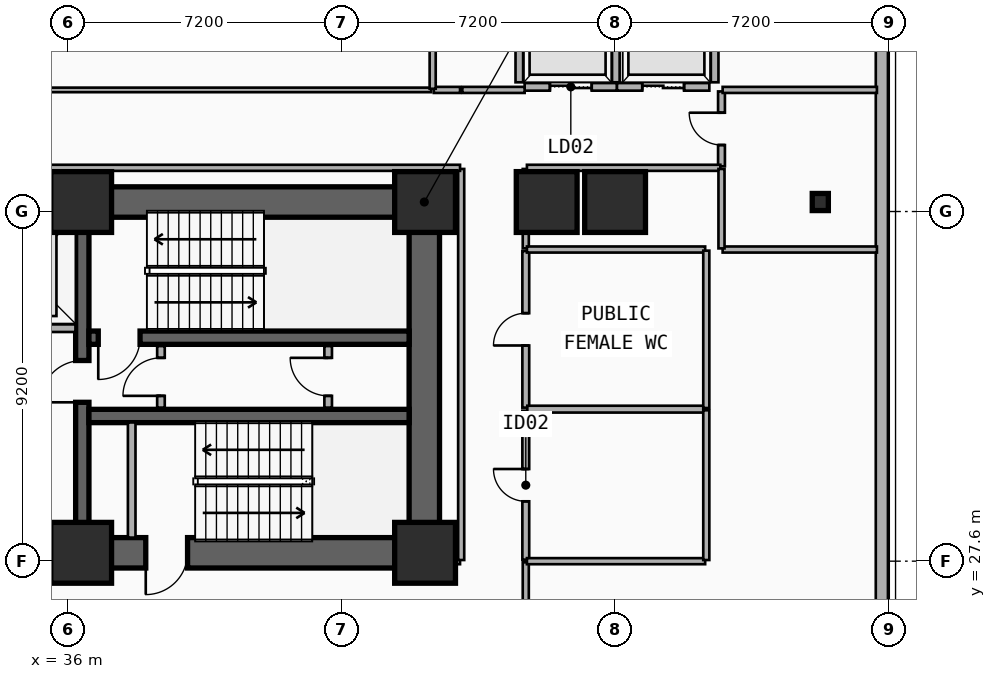
"""IFC4 building model, lengths in metres.
Left out: names, types, materials, properties, quantities, classifications, styles, units other than length and angle.
Written with IfcOpenShell. Run it as: python <this file> out.ifc"""

import sys

from ifc_helpers import new_model, si_unit, direction, frame, frame_2d, origin, origin_2d, place, context, subcontext, project, spatial, rectangle, i_section, extrude, element, fill, save


model = new_model("IFC4")
c1 = context("Model", 3, precision=1e-05, world=origin(), true_north=direction((0.0, 1.0)))
c2 = subcontext(c1, "Body", "Model", "MODEL_VIEW")
j1 = project(units=[si_unit("LENGTHUNIT", "METRE"), si_unit("PLANEANGLEUNIT", "RADIAN")], contexts=[c1])
p1 = place(None, origin())
s1 = spatial("IfcSite", under=j1, at=p1, CompositionType="ELEMENT")
p2 = place(p1, origin())
s2 = spatial("IfcBuilding", under=s1, at=p2, CompositionType="ELEMENT")
p3 = place(p2, frame((0.0, 0.0, 14.9)))
s3 = spatial("IfcBuildingStorey", under=s2, at=p3, CompositionType="ELEMENT", Elevation=14.9)
p4 = place(p3, frame((12.15, 37.05, 0.0), z_axis=(0.0, 0.0, 1.0), x_axis=(1.0, 0.0, 0.0)))
e1 = element("IfcWall", 1, at=p4, inside=s3, PredefinedType="SHEAR", context=c2, shape_type="SweptSolid", body=[
    extrude(rectangle(XDim=33.23, YDim=0.8, at=frame_2d((16.615, 0.0))), origin(), (0.0, 0.0, 1.0), 4.5),
])
p5 = place(p3, frame((45.38, 27.82, 0.0), z_axis=(0.0, 0.0, 1.0), x_axis=(-1.0, 0.0, 0.0)))
e2 = element("IfcWall", 2, at=p5, inside=s3, PredefinedType="SHEAR", context=c2, shape_type="SweptSolid", body=[
    extrude(rectangle(XDim=12.23, YDim=0.8, at=frame_2d((6.115, 0.0))), origin(), (0.0, 0.0, 1.0), 4.5),
])
p6 = place(p5, frame((9.93, 0.0, 0.0)))
e3 = element("IfcOpeningElement", 3, at=p6, cuts=e2, PredefinedType="OPENING", context=c2, shape_type="SweptSolid", body=[
    extrude(rectangle(XDim=1.1, YDim=2.15, at=frame_2d((0.55, 1.075))), frame((0.0, 0.41, 0.0), z_axis=(0.0, -1.0, 0.0), x_axis=(1.0, 0.0, 0.0)), (0.0, 0.0, 1.0), 0.82),
])
p7 = place(p5, frame((6.23, 0.0, 0.0)))
e4 = element("IfcOpeningElement", 4, at=p7, cuts=e2, PredefinedType="OPENING", context=c2, shape_type="SweptSolid", body=[
    extrude(rectangle(XDim=1.1, YDim=2.15, at=frame_2d((0.55, 1.075))), frame((0.0, 0.41, 0.0), z_axis=(0.0, -1.0, 0.0), x_axis=(1.0, 0.0, 0.0)), (0.0, 0.0, 1.0), 0.82),
])
p8 = place(p3, frame((45.38, 28.22, 0.0), z_axis=(0.0, 0.0, 1.0), x_axis=(0.0, 1.0, 0.0)))
e5 = element("IfcWall", 5, at=p8, inside=s3, PredefinedType="SHEAR", context=c2, shape_type="SweptSolid", body=[
    extrude(rectangle(XDim=8.43, YDim=0.8, at=frame_2d((4.215, 0.0))), origin(), (0.0, 0.0, 1.0), 4.5),
])
p9 = place(p3, frame((36.38, 28.22, 0.0), z_axis=(0.0, 0.0, 1.0), x_axis=(0.0, 1.0, 0.0)))
e6 = element("IfcWall", 6, at=p9, inside=s3, PredefinedType="SHEAR", context=c2, shape_type="SweptSolid", body=[
    extrude(rectangle(XDim=8.43, YDim=0.35, at=frame_2d((4.215, 0.0))), origin(), (0.0, 0.0, 1.0), 4.5),
])
p10 = place(p9, frame((3.56, 0.0, 0.0)))
e7 = element("IfcOpeningElement", 7, at=p10, cuts=e6, PredefinedType="OPENING", context=c2, shape_type="SweptSolid", body=[
    extrude(rectangle(XDim=1.1, YDim=2.15, at=frame_2d((0.55, 1.075))), frame((0.0, 0.185, 0.0), z_axis=(0.0, -1.0, 0.0), x_axis=(1.0, 0.0, 0.0)), (0.0, 0.0, 1.0), 0.37),
])
p11 = place(p3, frame((44.98, 33.48, 0.0), z_axis=(0.0, 0.0, 1.0), x_axis=(-1.0, 0.0, 0.0)))
e8 = element("IfcWall", 8, at=p11, inside=s3, PredefinedType="SHEAR", context=c2, shape_type="SweptSolid", body=[
    extrude(rectangle(XDim=8.425, YDim=0.35, at=frame_2d((4.212, 0.0))), origin(), (0.0, 0.0, 1.0), 4.5),
])
p12 = place(p11, frame((7.08, 0.0, 0.0)))
e9 = element("IfcOpeningElement", 9, at=p12, cuts=e8, PredefinedType="OPENING", context=c2, shape_type="SweptSolid", body=[
    extrude(rectangle(XDim=1.1, YDim=2.15, at=frame_2d((0.55, 1.075))), frame((0.0, 0.185, 0.0), z_axis=(0.0, -1.0, 0.0), x_axis=(1.0, 0.0, 0.0)), (0.0, 0.0, 1.0), 0.37),
])
p13 = place(p3, frame((36.555, 31.42, 0.0), z_axis=(0.0, 0.0, 1.0), x_axis=(1.0, 0.0, 0.0)))
e10 = element("IfcWall", 10, at=p13, inside=s3, PredefinedType="SHEAR", context=c2, shape_type="SweptSolid", body=[
    extrude(rectangle(XDim=8.425, YDim=0.35, at=frame_2d((4.212, 0.0))), origin(), (0.0, 0.0, 1.0), 4.5),
])
for number, where, z_axis, x_axis in (
    (11, (36.35, 27.82, 0.0), (0.0, 0.0, 1.0), (1.0, 0.0, 0.0)),
    (12, (36.35, 37.05, 0.0), (0.0, 0.0, 1.0), (1.0, 0.0, 0.0)),
    (13, (45.4, 27.82, 0.0), (0.0, 0.0, 1.0), (1.0, 0.0, 0.0)),
    (14, (45.4, 37.05, 0.0), (0.0, 0.0, 1.0), (1.0, 0.0, 0.0)),
    (15, (48.6, 37.05, 0.0), (0.0, 0.0, 1.0), (1.0, 0.0, 0.0)),
    (16, (50.4, 37.05, 0.0), (0.0, 0.0, 1.0), (1.0, 0.0, 0.0)),
):
    element("IfcColumn", number, at=place(p3, frame(where, z_axis=z_axis, x_axis=x_axis)), inside=s3, PredefinedType="COLUMN", context=c2, shape_type="SweptSolid", body=[
        extrude(rectangle(XDim=1.6, YDim=1.6, at=origin_2d()), origin(), (0.0, 0.0, 1.0), 4.5),
    ])
p14 = place(p3, frame((55.8, 37.05, 0.0), z_axis=(0.0, 0.0, 1.0), x_axis=(1.0, 0.0, 0.0)))
e17 = element("IfcColumn", 17, at=p14, inside=s3, PredefinedType="COLUMN", context=c2, shape_type="SweptSolid", body=[
    extrude(i_section(OverallWidth=0.424, OverallDepth=0.45, WebThickness=0.041, FlangeThickness=0.065, FilletRadius=0.015, at=origin_2d()), origin(), (0.0, 0.0, 1.0), 4.5),
])
p15 = place(p3, frame((57.42, 41.6, 0.0), z_axis=(0.0, 0.0, 1.0), x_axis=(0.0, -1.0, 0.0)))
e18 = element("IfcWall", 18, at=p15, inside=s3, PredefinedType="SOLIDWALL", context=c2, shape_type="SweptSolid", body=[
    extrude(rectangle(XDim=34.4, YDim=0.32, at=frame_2d((17.2, 0.0))), origin(), (0.0, 0.0, 1.0), 4.2),
])
p16 = place(p15, frame((20.727, 0.0, 0.9)))
e19 = element("IfcOpeningElement", 19, at=p16, cuts=e18, PredefinedType="OPENING", context=c2, shape_type="SweptSolid", body=[
    extrude(rectangle(XDim=2.4, YDim=1.8, at=frame_2d((1.2, 0.9))), frame((0.0, 0.17, 0.0), z_axis=(0.0, -1.0, 0.0), x_axis=(1.0, 0.0, 0.0)), (0.0, 0.0, 1.0), 0.34),
])
p17 = place(p15, frame((27.403, 0.0, 0.9)))
e20 = element("IfcOpeningElement", 20, at=p17, cuts=e18, PredefinedType="OPENING", context=c2, shape_type="SweptSolid", body=[
    extrude(rectangle(XDim=2.4, YDim=1.8, at=frame_2d((1.2, 0.9))), frame((0.0, 0.17, 0.0), z_axis=(0.0, -1.0, 0.0), x_axis=(1.0, 0.0, 0.0)), (0.0, 0.0, 1.0), 0.34),
])
p18 = place(p3, frame((33.475, 33.73, 0.0), z_axis=(0.0, 0.0, 1.0), x_axis=(1.0, 0.0, 0.0)))
e21 = element("IfcWall", 21, at=p18, inside=s3, PredefinedType="PARTITIONING", context=c2, shape_type="SweptSolid", body=[
    extrude(rectangle(XDim=2.725, YDim=0.2, at=frame_2d((1.362, 0.0))), origin(), (0.0, 0.0, 1.0), 3.172),
])
p19 = place(p18, frame((0.812, 0.0, 0.0)))
e22 = element("IfcOpeningElement", 22, at=p19, cuts=e21, PredefinedType="OPENING", context=c2, shape_type="SweptSolid", body=[
    extrude(rectangle(XDim=1.1, YDim=2.15, at=frame_2d((0.55, 1.075))), frame((0.0, 0.11, 0.0), z_axis=(0.0, -1.0, 0.0), x_axis=(1.0, 0.0, 0.0)), (0.0, 0.0, 1.0), 0.22),
])
p20 = place(p3, frame((48.02, 40.08, 0.0), z_axis=(0.0, 0.0, 1.0), x_axis=(1.0, 0.0, 0.0)))
e23 = element("IfcWall", 23, at=p20, inside=s3, PredefinedType="PARTITIONING", context=c2, shape_type="SweptSolid", body=[
    extrude(rectangle(XDim=2.43, YDim=0.2, at=frame_2d((1.215, 0.0))), origin(), (0.0, 0.0, 1.0), 4.2),
])
p21 = place(p20, frame((0.665, 0.0, 0.0)))
e24 = element("IfcOpeningElement", 24, at=p21, cuts=e23, PredefinedType="OPENING", context=c2, shape_type="SweptSolid", body=[
    extrude(rectangle(XDim=1.1, YDim=2.15, at=frame_2d((0.55, 1.075))), frame((0.0, 0.11, 0.0), z_axis=(0.0, -1.0, 0.0), x_axis=(1.0, 0.0, 0.0)), (0.0, 0.0, 1.0), 0.22),
])
for number, where, z_axis, x_axis in (
    (25, (47.88, 40.2, 0.0), (0.0, 0.0, 1.0), (0.0, 1.0, 0.0)),
    (26, (50.42, 40.2, 0.0), (0.0, 0.0, 1.0), (0.0, 1.0, 0.0)),
):
    element("IfcWall", number, at=place(p3, frame(where, z_axis=z_axis, x_axis=x_axis)), inside=s3, PredefinedType="PARTITIONING", context=c2, shape_type="SweptSolid", body=[
        extrude(rectangle(XDim=2.6, YDim=0.2, at=frame_2d((1.3, 0.0))), origin(), (0.0, 0.0, 1.0), 4.2),
    ])
p22 = place(p3, frame((50.45, 40.08, 0.0), z_axis=(0.0, 0.0, 1.0), x_axis=(1.0, 0.0, 0.0)))
e27 = element("IfcWall", 27, at=p22, inside=s3, PredefinedType="PARTITIONING", context=c2, shape_type="SweptSolid", body=[
    extrude(rectangle(XDim=2.43, YDim=0.2, at=frame_2d((1.215, 0.0))), origin(), (0.0, 0.0, 1.0), 4.2),
])
p23 = place(p22, frame((0.665, 0.0, 0.0)))
e28 = element("IfcOpeningElement", 28, at=p23, cuts=e27, PredefinedType="OPENING", context=c2, shape_type="SweptSolid", body=[
    extrude(rectangle(XDim=1.1, YDim=2.15, at=frame_2d((0.55, 1.075))), frame((0.0, 0.11, 0.0), z_axis=(0.0, -1.0, 0.0), x_axis=(1.0, 0.0, 0.0)), (0.0, 0.0, 1.0), 0.22),
])
p24 = place(p3, frame((53.02, 40.2, 0.0), z_axis=(0.0, 0.0, 1.0), x_axis=(0.0, 1.0, 0.0)))
e29 = element("IfcWall", 29, at=p24, inside=s3, PredefinedType="PARTITIONING", context=c2, shape_type="SweptSolid", body=[
    extrude(rectangle(XDim=2.6, YDim=0.2, at=frame_2d((1.3, 0.0))), origin(), (0.0, 0.0, 1.0), 4.2),
])
p25 = place(p3, frame((37.68, 28.22, 0.0), z_axis=(0.0, 0.0, 1.0), x_axis=(0.0, 1.0, 0.0)))
e30 = element("IfcWall", 30, at=p25, inside=s3, PredefinedType="PARTITIONING", context=c2, shape_type="SweptSolid", body=[
    extrude(rectangle(XDim=3.03, YDim=0.2, at=frame_2d((1.515, 0.0))), origin(), (0.0, 0.0, 1.0), 4.2),
])
p26 = place(p3, frame((38.45, 31.64, 0.0), z_axis=(0.0, 0.0, 1.0), x_axis=(0.0, 1.0, 0.0)))
e31 = element("IfcWall", 31, at=p26, inside=s3, PredefinedType="PARTITIONING", context=c2, shape_type="SweptSolid", body=[
    extrude(rectangle(XDim=1.62, YDim=0.2, at=frame_2d((0.81, 0.0))), origin(), (0.0, 0.0, 1.0), 4.2),
])
p27 = place(p26, frame((0.31, 0.0, 0.0)))
e32 = element("IfcOpeningElement", 32, at=p27, cuts=e31, PredefinedType="OPENING", context=c2, shape_type="SweptSolid", body=[
    extrude(rectangle(XDim=1.0, YDim=2.15, at=frame_2d((0.5, 1.075))), frame((0.0, 0.11, 0.0), z_axis=(0.0, -1.0, 0.0), x_axis=(1.0, 0.0, 0.0)), (0.0, 0.0, 1.0), 0.22),
])
p28 = place(p3, frame((42.85, 31.64, 0.0), z_axis=(0.0, 0.0, 1.0), x_axis=(0.0, 1.0, 0.0)))
e33 = element("IfcWall", 33, at=p28, inside=s3, PredefinedType="PARTITIONING", context=c2, shape_type="SweptSolid", body=[
    extrude(rectangle(XDim=1.62, YDim=0.2, at=frame_2d((0.81, 0.0))), origin(), (0.0, 0.0, 1.0), 4.2),
])
p29 = place(p28, frame((0.31, 0.0, 0.0)))
e34 = element("IfcOpeningElement", 34, at=p29, cuts=e33, PredefinedType="OPENING", context=c2, shape_type="SweptSolid", body=[
    extrude(rectangle(XDim=1.0, YDim=2.15, at=frame_2d((0.5, 1.075))), frame((0.0, 0.11, 0.0), z_axis=(0.0, -1.0, 0.0), x_axis=(1.0, 0.0, 0.0)), (0.0, 0.0, 1.0), 0.22),
])
p30 = place(p3, frame((48.05, 27.64, 0.0), z_axis=(0.0, 0.0, 1.0), x_axis=(0.0, 1.0, 0.0)))
e35 = element("IfcWall", 35, at=p30, inside=s3, PredefinedType="PLUMBINGWALL", context=c2, shape_type="SweptSolid", body=[
    extrude(rectangle(XDim=3.92, YDim=0.18, at=frame_2d((1.96, 0.0))), origin(), (0.0, 0.0, 1.0), 4.2),
])
p31 = place(p30, frame((1.535, 0.0, 0.0)))
e36 = element("IfcOpeningElement", 36, at=p31, cuts=e35, PredefinedType="OPENING", context=c2, shape_type="SweptSolid", body=[
    extrude(rectangle(XDim=0.85, YDim=2.1, at=frame_2d((0.425, 1.05))), frame((0.0, 0.1, 0.0), z_axis=(0.0, -1.0, 0.0), x_axis=(1.0, 0.0, 0.0)), (0.0, 0.0, 1.0), 0.2),
])
p32 = place(p3, frame((48.05, 31.64, 0.0), z_axis=(0.0, 0.0, 1.0), x_axis=(0.0, 1.0, 0.0)))
e37 = element("IfcWall", 37, at=p32, inside=s3, PredefinedType="PLUMBINGWALL", context=c2, shape_type="SweptSolid", body=[
    extrude(rectangle(XDim=4.12, YDim=0.18, at=frame_2d((2.06, 0.0))), origin(), (0.0, 0.0, 1.0), 4.2),
])
p33 = place(p32, frame((1.635, 0.0, 0.0)))
e38 = element("IfcOpeningElement", 38, at=p33, cuts=e37, PredefinedType="OPENING", context=c2, shape_type="SweptSolid", body=[
    extrude(rectangle(XDim=0.85, YDim=2.1, at=frame_2d((0.425, 1.05))), frame((0.0, 0.1, 0.0), z_axis=(0.0, -1.0, 0.0), x_axis=(1.0, 0.0, 0.0)), (0.0, 0.0, 1.0), 0.2),
])
p34 = place(p3, frame((12.04, 40.0, 0.0), z_axis=(0.0, 0.0, 1.0), x_axis=(1.0, 0.0, 0.0)))
e39 = element("IfcWall", 39, at=p34, inside=s3, PredefinedType="PARTITIONING", context=c2, shape_type="SweptSolid", body=[
    extrude(rectangle(XDim=33.52, YDim=0.12, at=frame_2d((16.76, 0.0))), origin(), (0.0, 0.0, 1.0), 3.53),
])
p35 = place(p34, frame((16.31, 0.0, 0.0)))
e40 = element("IfcOpeningElement", 40, at=p35, cuts=e39, PredefinedType="OPENING", context=c2, shape_type="SweptSolid", body=[
    extrude(rectangle(XDim=0.9, YDim=2.1, at=frame_2d((0.45, 1.05))), frame((0.0, 0.07, 0.0), z_axis=(0.0, -1.0, 0.0), x_axis=(1.0, 0.0, 0.0)), (0.0, 0.0, 1.0), 0.14),
])
p36 = place(p3, frame((53.2, 37.99, 0.0), z_axis=(0.0, 0.0, 1.0), x_axis=(0.0, 1.0, 0.0)))
e41 = element("IfcWall", 41, at=p36, inside=s3, PredefinedType="PLUMBINGWALL", context=c2, shape_type="SweptSolid", body=[
    extrude(rectangle(XDim=1.97, YDim=0.18, at=frame_2d((0.985, 0.0))), origin(), (0.0, 0.0, 1.0), 4.2),
])
p37 = place(p36, frame((0.56, 0.0, 0.0)))
e42 = element("IfcOpeningElement", 42, at=p37, cuts=e41, PredefinedType="OPENING", context=c2, shape_type="SweptSolid", body=[
    extrude(rectangle(XDim=0.85, YDim=2.1, at=frame_2d((0.425, 1.05))), frame((0.0, 0.1, 0.0), z_axis=(0.0, -1.0, 0.0), x_axis=(1.0, 0.0, 0.0)), (0.0, 0.0, 1.0), 0.2),
])
p38 = place(p3, frame((48.09, 31.6, 0.0), z_axis=(0.0, 0.0, 1.0), x_axis=(1.0, 0.0, 0.0)))
e43 = element("IfcWall", 43, at=p38, inside=s3, PredefinedType="PLUMBINGWALL", context=c2, shape_type="SweptSolid", body=[
    extrude(rectangle(XDim=4.67, YDim=0.18, at=frame_2d((2.335, 0.0))), origin(), (0.0, 0.0, 1.0), 4.2),
])
p39 = place(p3, frame((45.41, 27.6, 0.0), z_axis=(0.0, 0.0, 1.0), x_axis=(1.0, 0.0, 0.0)))
e44 = element("IfcWall", 44, at=p39, inside=s3, PredefinedType="PARTITIONING", context=c2, shape_type="SweptSolid", body=[
    extrude(rectangle(XDim=0.91, YDim=0.16, at=frame_2d((0.455, 0.0))), origin(), (0.0, 0.0, 1.0), 3.172),
])
p40 = place(p3, frame((48.05, 25.48, 0.0), z_axis=(0.0, 0.0, 1.0), x_axis=(0.0, 1.0, 0.0)))
e45 = element("IfcWall", 45, at=p40, inside=s3, PredefinedType="PARTITIONING", context=c2, shape_type="SweptSolid", body=[
    extrude(rectangle(XDim=2.09, YDim=0.16, at=frame_2d((1.045, 0.0))), origin(), (0.0, 0.0, 1.0), 4.2),
])
p41 = place(p3, frame((46.38, 40.0, 0.0), z_axis=(0.0, 0.0, 1.0), x_axis=(1.0, 0.0, 0.0)))
e46 = element("IfcWall", 46, at=p41, inside=s3, PredefinedType="PARTITIONING", context=c2, shape_type="SweptSolid", body=[
    extrude(rectangle(XDim=1.64, YDim=0.16, at=frame_2d((0.82, 0.0))), origin(), (0.0, 0.0, 1.0), 4.2),
])
p42 = place(p3, frame((46.35, 27.63, 0.0), z_axis=(0.0, 0.0, 1.0), x_axis=(0.0, 1.0, 0.0)))
e47 = element("IfcWall", 47, at=p42, inside=s3, PredefinedType="PARTITIONING", context=c2, shape_type="SweptSolid", body=[
    extrude(rectangle(XDim=10.29, YDim=0.16, at=frame_2d((5.145, 0.0))), origin(), (0.0, 0.0, 1.0), 4.2),
])
p43 = place(p3, frame((48.05, 35.83, 0.0), z_axis=(0.0, 0.0, 1.0), x_axis=(0.0, 1.0, 0.0)))
e48 = element("IfcWall", 48, at=p43, inside=s3, PredefinedType="PARTITIONING", context=c2, shape_type="SweptSolid", body=[
    extrude(rectangle(XDim=2.09, YDim=0.16, at=frame_2d((1.045, 0.0))), origin(), (0.0, 0.0, 1.0), 4.2),
])
p44 = place(p3, frame((11.28, 37.95, 0.0), z_axis=(0.0, 0.0, 1.0), x_axis=(1.0, 0.0, 0.0)))
e49 = element("IfcWall", 49, at=p44, inside=s3, PredefinedType="PARTITIONING", context=c2, shape_type="SweptSolid", body=[
    extrude(rectangle(XDim=35.04, YDim=0.16, at=frame_2d((17.52, 0.0))), origin(), (0.0, 0.0, 1.0), 3.53),
])
p45 = place(p3, frame((45.63, 40.0, 0.0), z_axis=(0.0, 0.0, 1.0), x_axis=(1.0, 0.0, 0.0)))
e50 = element("IfcWall", 50, at=p45, inside=s3, PredefinedType="PARTITIONING", context=c2, shape_type="SweptSolid", body=[
    extrude(rectangle(XDim=0.69, YDim=0.16, at=frame_2d((0.345, 0.0))), origin(), (0.0, 0.0, 1.0), 3.53),
])
p46 = place(p3, frame((48.08, 37.95, 0.0), z_axis=(0.0, 0.0, 1.0), x_axis=(1.0, 0.0, 0.0)))
e51 = element("IfcWall", 51, at=p46, inside=s3, PredefinedType="PARTITIONING", context=c2, shape_type="SweptSolid", body=[
    extrude(rectangle(XDim=5.09, YDim=0.16, at=frame_2d((2.545, 0.0))), origin(), (0.0, 0.0, 1.0), 4.2),
])
p47 = place(p3, frame((48.08, 27.6, 0.0), z_axis=(0.0, 0.0, 1.0), x_axis=(1.0, 0.0, 0.0)))
e52 = element("IfcWall", 52, at=p47, inside=s3, PredefinedType="PARTITIONING", context=c2, shape_type="SweptSolid", body=[
    extrude(rectangle(XDim=4.69, YDim=0.16, at=frame_2d((2.345, 0.0))), origin(), (0.0, 0.0, 1.0), 4.2),
])
p48 = place(p3, frame((52.8, 27.63, 0.0), z_axis=(0.0, 0.0, 1.0), x_axis=(0.0, 1.0, 0.0)))
e53 = element("IfcWall", 53, at=p48, inside=s3, PredefinedType="PARTITIONING", context=c2, shape_type="SweptSolid", body=[
    extrude(rectangle(XDim=3.94, YDim=0.16, at=frame_2d((1.97, 0.0))), origin(), (0.0, 0.0, 1.0), 4.2),
])
p49 = place(p3, frame((48.08, 35.8, 0.0), z_axis=(0.0, 0.0, 1.0), x_axis=(1.0, 0.0, 0.0)))
e54 = element("IfcWall", 54, at=p49, inside=s3, PredefinedType="PARTITIONING", context=c2, shape_type="SweptSolid", body=[
    extrude(rectangle(XDim=4.69, YDim=0.16, at=frame_2d((2.345, 0.0))), origin(), (0.0, 0.0, 1.0), 4.2),
])
p50 = place(p3, frame((52.8, 31.63, 0.0), z_axis=(0.0, 0.0, 1.0), x_axis=(0.0, 1.0, 0.0)))
e55 = element("IfcWall", 55, at=p50, inside=s3, PredefinedType="PARTITIONING", context=c2, shape_type="SweptSolid", body=[
    extrude(rectangle(XDim=4.14, YDim=0.16, at=frame_2d((2.07, 0.0))), origin(), (0.0, 0.0, 1.0), 4.2),
])
for number, where, z_axis, x_axis in (
    (56, (53.23, 35.8, 0.0), (0.0, 0.0, 1.0), (1.0, 0.0, 0.0)),
    (57, (53.23, 40.0, 0.0), (0.0, 0.0, 1.0), (1.0, 0.0, 0.0)),
):
    element("IfcWall", number, at=place(p3, frame(where, z_axis=z_axis, x_axis=x_axis)), inside=s3, PredefinedType="PARTITIONING", context=c2, shape_type="SweptSolid", body=[
        extrude(rectangle(XDim=4.06, YDim=0.16, at=frame_2d((2.03, 0.0))), origin(), (0.0, 0.0, 1.0), 4.2),
    ])
p51 = place(p3, frame((53.2, 35.83, 0.0), z_axis=(0.0, 0.0, 1.0), x_axis=(0.0, 1.0, 0.0)))
e58 = element("IfcWall", 58, at=p51, inside=s3, PredefinedType="PARTITIONING", context=c2, shape_type="SweptSolid", body=[
    extrude(rectangle(XDim=2.09, YDim=0.16, at=frame_2d((1.045, 0.0))), origin(), (0.0, 0.0, 1.0), 4.2),
])
p52 = place(p3, frame((45.6, 40.03, 0.0), z_axis=(0.0, 0.0, 1.0), x_axis=(0.0, 1.0, 0.0)))
e59 = element("IfcWall", 59, at=p52, inside=s3, PredefinedType="PARTITIONING", context=c2, shape_type="SweptSolid", body=[
    extrude(rectangle(XDim=4.86, YDim=0.16, at=frame_2d((2.43, 0.0))), origin(), (0.0, 0.0, 1.0), 3.53),
])
p53 = place(p21, origin())
e60 = element("IfcDoor", 60, at=p53, inside=s3, OperationType="DOUBLE_DOOR_SLIDING", PredefinedType="DOOR", context=c2, shape_type="SweptSolid", body=[
    extrude(rectangle(XDim=1.1, YDim=2.15, at=frame_2d((0.55, 1.075))), frame((0.0, 0.025, 0.0), z_axis=(0.0, -1.0, 0.0), x_axis=(1.0, 0.0, 0.0)), (0.0, 0.0, 1.0), 0.05),
])
fill(e24, e60)
p54 = place(p23, origin())
e61 = element("IfcDoor", 61, at=p54, inside=s3, OperationType="DOUBLE_DOOR_SLIDING", PredefinedType="DOOR", context=c2, shape_type="SweptSolid", body=[
    extrude(rectangle(XDim=1.1, YDim=2.15, at=frame_2d((0.55, 1.075))), frame((0.0, 0.025, 0.0), z_axis=(0.0, -1.0, 0.0), x_axis=(1.0, 0.0, 0.0)), (0.0, 0.0, 1.0), 0.05),
])
fill(e28, e61)
p55 = place(p12, origin())
e62 = element("IfcDoor", 62, at=p55, inside=s3, OperationType="SINGLE_SWING_RIGHT", PredefinedType="DOOR", context=c2, shape_type="SweptSolid", body=[
    extrude(rectangle(XDim=1.1, YDim=2.15, at=frame_2d((0.55, 1.075))), frame((0.0, 0.025, 0.0), z_axis=(0.0, -1.0, 0.0), x_axis=(1.0, 0.0, 0.0)), (0.0, 0.0, 1.0), 0.05),
])
fill(e9, e62)
p56 = place(p10, origin())
e63 = element("IfcDoor", 63, at=p56, inside=s3, OperationType="SINGLE_SWING_LEFT", PredefinedType="DOOR", context=c2, shape_type="SweptSolid", body=[
    extrude(rectangle(XDim=1.1, YDim=2.15, at=frame_2d((0.55, 1.075))), frame((0.0, 0.025, 0.0), z_axis=(0.0, -1.0, 0.0), x_axis=(1.0, 0.0, 0.0)), (0.0, 0.0, 1.0), 0.05),
])
fill(e7, e63)
p57 = place(p7, origin())
e64 = element("IfcDoor", 64, at=p57, inside=s3, OperationType="SINGLE_SWING_RIGHT", PredefinedType="DOOR", context=c2, shape_type="SweptSolid", body=[
    extrude(rectangle(XDim=1.1, YDim=2.15, at=frame_2d((0.55, 1.075))), frame((0.0, 0.025, 0.0), z_axis=(0.0, -1.0, 0.0), x_axis=(1.0, 0.0, 0.0)), (0.0, 0.0, 1.0), 0.05),
])
fill(e4, e64)
p58 = place(p27, origin())
e65 = element("IfcDoor", 65, at=p58, inside=s3, OperationType="SINGLE_SWING_LEFT", PredefinedType="DOOR", context=c2, shape_type="SweptSolid", body=[
    extrude(rectangle(XDim=1.0, YDim=2.15, at=frame_2d((0.5, 1.075))), frame((0.0, 0.025, 0.0), z_axis=(0.0, -1.0, 0.0), x_axis=(1.0, 0.0, 0.0)), (0.0, 0.0, 1.0), 0.05),
])
fill(e32, e65)
p59 = place(p29, origin())
e66 = element("IfcDoor", 66, at=p59, inside=s3, OperationType="SINGLE_SWING_RIGHT", PredefinedType="DOOR", context=c2, shape_type="SweptSolid", body=[
    extrude(rectangle(XDim=1.0, YDim=2.15, at=frame_2d((0.5, 1.075))), frame((0.0, 0.025, 0.0), z_axis=(0.0, -1.0, 0.0), x_axis=(1.0, 0.0, 0.0)), (0.0, 0.0, 1.0), 0.05),
])
fill(e34, e66)
p60 = place(p31, origin())
e67 = element("IfcDoor", 67, at=p60, inside=s3, OperationType="SINGLE_SWING_RIGHT", PredefinedType="DOOR", context=c2, shape_type="SweptSolid", body=[
    extrude(rectangle(XDim=0.85, YDim=2.1, at=frame_2d((0.425, 1.05))), frame((0.0, 0.025, 0.0), z_axis=(0.0, -1.0, 0.0), x_axis=(1.0, 0.0, 0.0)), (0.0, 0.0, 1.0), 0.05),
])
fill(e36, e67)
p61 = place(p33, origin())
e68 = element("IfcDoor", 68, at=p61, inside=s3, OperationType="SINGLE_SWING_LEFT", PredefinedType="DOOR", context=c2, shape_type="SweptSolid", body=[
    extrude(rectangle(XDim=0.85, YDim=2.1, at=frame_2d((0.425, 1.05))), frame((0.0, 0.025, 0.0), z_axis=(0.0, -1.0, 0.0), x_axis=(1.0, 0.0, 0.0)), (0.0, 0.0, 1.0), 0.05),
])
fill(e38, e68)
p62 = place(p37, origin())
e69 = element("IfcDoor", 69, at=p62, inside=s3, OperationType="SINGLE_SWING_RIGHT", PredefinedType="DOOR", context=c2, shape_type="SweptSolid", body=[
    extrude(rectangle(XDim=0.85, YDim=2.1, at=frame_2d((0.425, 1.05))), frame((0.0, 0.025, 0.0), z_axis=(0.0, -1.0, 0.0), x_axis=(1.0, 0.0, 0.0)), (0.0, 0.0, 1.0), 0.05),
])
fill(e42, e69)
save(model, sys.argv[1])
